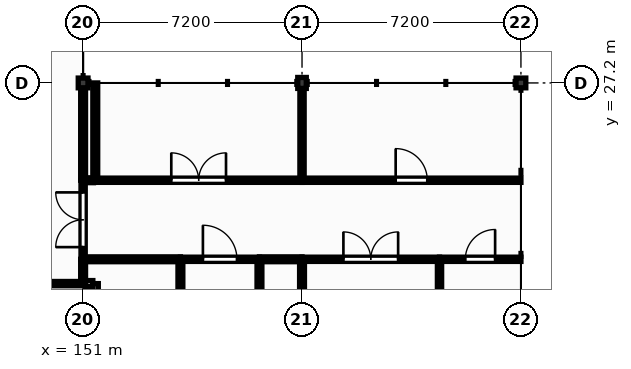
"""IFC4 building model, lengths in metres.
Left out: names, types, materials, properties, quantities, classifications, styles, units other than length and angle.
Written with IfcOpenShell. Run it as: python <this file> out.ifc"""

import sys

from ifc_helpers import new_model, si_unit, direction, frame, frame_2d, origin, origin_2d, place, context, subcontext, project, spatial, rectangle, extrude, element, fill, save


model = new_model("IFC4")
c1 = context("Model", 3, precision=1e-05, world=origin(), true_north=direction((0.0, 1.0)))
c2 = subcontext(c1, "Body", "Model", "MODEL_VIEW")
j1 = project(units=[si_unit("LENGTHUNIT", "METRE"), si_unit("PLANEANGLEUNIT", "RADIAN")], contexts=[c1])
p1 = place(None, origin())
s1 = spatial("IfcSite", under=j1, at=p1, CompositionType="ELEMENT")
p2 = place(p1, origin())
s2 = spatial("IfcBuilding", under=s1, at=p2, CompositionType="ELEMENT")
p3 = place(p2, frame((0.0, 0.0, 9.0)))
s3 = spatial("IfcBuildingStorey", under=s2, at=p3, CompositionType="ELEMENT", Elevation=9.0)
p4 = place(p3, frame((151.0, 27.2, 0.0), z_axis=(0.0, 0.0, 1.0), x_axis=(1.0, 0.0, 0.0)))
e1 = element("IfcColumn", 1, at=p4, inside=s3, PredefinedType="COLUMN", context=c2, shape_type="SweptSolid", body=[
    extrude(rectangle(XDim=0.32, YDim=0.32, at=origin_2d()), origin(), (0.0, 0.0, 1.0), 5.775),
])
p5 = place(p3, frame((158.2, 27.2, 0.0), z_axis=(0.0, 0.0, 1.0), x_axis=(1.0, 0.0, 0.0)))
e2 = element("IfcColumn", 2, at=p5, inside=s3, PredefinedType="COLUMN", context=c2, shape_type="SweptSolid", body=[
    extrude(rectangle(XDim=0.28, YDim=0.36, at=origin_2d()), origin(), (0.0, 0.0, 1.0), 7.57),
])
p6 = place(p3, frame((165.4, 27.2, 0.0), z_axis=(0.0, 0.0, 1.0), x_axis=(1.0, 0.0, 0.0)))
e3 = element("IfcColumn", 3, at=p6, inside=s3, PredefinedType="COLUMN", context=c2, shape_type="SweptSolid", body=[
    extrude(rectangle(XDim=0.32, YDim=0.32, at=origin_2d()), origin(), (0.0, 0.0, 1.0), 9.365),
])
p7 = place(p3, frame((147.6, 20.6, 0.0), z_axis=(0.0, 0.0, 1.0), x_axis=(1.0, 0.0, 0.0)))
e4 = element("IfcWall", 4, at=p7, inside=s3, PredefinedType="PARTITIONING", context=c2, shape_type="SweptSolid", body=[
    extrude(rectangle(XDim=3.4, YDim=0.14, at=frame_2d((1.7, 0.0))), origin(), (0.0, 0.0, 1.0), 3.78),
])
p8 = place(p7, frame((1.24, 0.0, 0.0)))
e5 = element("IfcOpeningElement", 5, at=p8, cuts=e4, PredefinedType="OPENING", context=c2, shape_type="SweptSolid", body=[
    extrude(rectangle(XDim=0.92, YDim=2.1, at=frame_2d((0.46, 1.05))), frame((0.0, 0.08, 0.0), z_axis=(0.0, -1.0, 0.0), x_axis=(1.0, 0.0, 0.0)), (0.0, 0.0, 1.0), 0.16),
])
p9 = place(p3, frame((151.0, 21.4, 0.0), z_axis=(0.0, 0.0, 1.0), x_axis=(0.0, 1.0, 0.0)))
e6 = element("IfcWall", 6, at=p9, inside=s3, PredefinedType="PARTITIONING", context=c2, shape_type="SweptSolid", body=[
    extrude(rectangle(XDim=2.6, YDim=0.14, at=frame_2d((1.3, 0.0))), origin(), (0.0, 0.0, 1.0), 3.78),
])
p10 = place(p9, frame((0.4, 0.0, 0.0)))
e7 = element("IfcOpeningElement", 7, at=p10, cuts=e6, PredefinedType="OPENING", context=c2, shape_type="SweptSolid", body=[
    extrude(rectangle(XDim=1.8, YDim=2.3, at=frame_2d((0.9, 1.15))), frame((0.0, 0.08, 0.0), z_axis=(0.0, -1.0, 0.0), x_axis=(1.0, 0.0, 0.0)), (0.0, 0.0, 1.0), 0.16),
])
p11 = place(p3, frame((151.4, 24.0, 0.0), z_axis=(0.0, 0.0, 1.0), x_axis=(1.0, 0.0, 0.0)))
e8 = element("IfcWall", 8, at=p11, inside=s3, PredefinedType="PARTITIONING", context=c2, shape_type="SweptSolid", body=[
    extrude(rectangle(XDim=6.8, YDim=0.14, at=frame_2d((3.4, 0.0))), origin(), (0.0, 0.0, 1.0), 3.78),
])
p12 = place(p11, frame((2.5, 0.0, 0.0)))
e9 = element("IfcOpeningElement", 9, at=p12, cuts=e8, PredefinedType="OPENING", context=c2, shape_type="SweptSolid", body=[
    extrude(rectangle(XDim=1.8, YDim=2.3, at=frame_2d((0.9, 1.15))), frame((0.0, 0.08, 0.0), z_axis=(0.0, -1.0, 0.0), x_axis=(1.0, 0.0, 0.0)), (0.0, 0.0, 1.0), 0.16),
])
p13 = place(p3, frame((154.2, 21.4, 0.0), z_axis=(0.0, 0.0, 1.0), x_axis=(1.0, 0.0, 0.0)))
e10 = element("IfcWall", 10, at=p13, inside=s3, PredefinedType="PARTITIONING", context=c2, shape_type="SweptSolid", body=[
    extrude(rectangle(XDim=2.6, YDim=0.14, at=frame_2d((1.3, 0.0))), origin(), (0.0, 0.0, 1.0), 3.78),
])
p14 = place(p13, frame((0.74, 0.0, 0.0)))
e11 = element("IfcOpeningElement", 11, at=p14, cuts=e10, PredefinedType="OPENING", context=c2, shape_type="SweptSolid", body=[
    extrude(rectangle(XDim=1.12, YDim=2.15, at=frame_2d((0.56, 1.075))), frame((0.0, 0.08, 0.0), z_axis=(0.0, -1.0, 0.0), x_axis=(1.0, 0.0, 0.0)), (0.0, 0.0, 1.0), 0.16),
])
p15 = place(p3, frame((158.2, 21.4, 0.0), z_axis=(0.0, 0.0, 1.0), x_axis=(1.0, 0.0, 0.0)))
e12 = element("IfcWall", 12, at=p15, inside=s3, PredefinedType="PARTITIONING", context=c2, shape_type="SweptSolid", body=[
    extrude(rectangle(XDim=4.522, YDim=0.14, at=frame_2d((2.261, 0.0))), origin(), (0.0, 0.0, 1.0), 3.78),
])
p16 = place(p15, frame((1.361, 0.0, 0.0)))
e13 = element("IfcOpeningElement", 13, at=p16, cuts=e12, PredefinedType="OPENING", context=c2, shape_type="SweptSolid", body=[
    extrude(rectangle(XDim=1.8, YDim=2.3, at=frame_2d((0.9, 1.15))), frame((0.0, 0.08, 0.0), z_axis=(0.0, -1.0, 0.0), x_axis=(1.0, 0.0, 0.0)), (0.0, 0.0, 1.0), 0.16),
])
p17 = place(p3, frame((158.2, 24.07, 0.0), z_axis=(0.0, 0.0, 1.0), x_axis=(0.0, 1.0, 0.0)))
e14 = element("IfcWall", 14, at=p17, inside=s3, PredefinedType="PARTITIONING", context=c2, shape_type="SweptSolid", body=[
    extrude(rectangle(XDim=2.95, YDim=0.14, at=frame_2d((1.475, 0.0))), origin(), (0.0, 0.0, 1.0), 3.78),
])
p18 = place(p3, frame((158.2, 24.0, 0.0), z_axis=(0.0, 0.0, 1.0), x_axis=(1.0, 0.0, 0.0)))
e15 = element("IfcWall", 15, at=p18, inside=s3, PredefinedType="PARTITIONING", context=c2, shape_type="SweptSolid", body=[
    extrude(rectangle(XDim=7.2, YDim=0.14, at=frame_2d((3.6, 0.0))), origin(), (0.0, 0.0, 1.0), 3.78),
])
p19 = place(p18, frame((3.08, 0.0, 0.0)))
e16 = element("IfcOpeningElement", 16, at=p19, cuts=e15, PredefinedType="OPENING", context=c2, shape_type="SweptSolid", body=[
    extrude(rectangle(XDim=1.04, YDim=2.1, at=frame_2d((0.52, 1.05))), frame((0.0, 0.08, 0.0), z_axis=(0.0, -1.0, 0.0), x_axis=(1.0, 0.0, 0.0)), (0.0, 0.0, 1.0), 0.16),
])
p20 = place(p3, frame((162.722, 18.6, 0.0), z_axis=(0.0, 0.0, 1.0), x_axis=(0.0, 1.0, 0.0)))
e17 = element("IfcWall", 17, at=p20, inside=s3, PredefinedType="PARTITIONING", context=c2, shape_type="SweptSolid", body=[
    extrude(rectangle(XDim=2.73, YDim=0.14, at=frame_2d((1.365, 0.0))), origin(), (0.0, 0.0, 1.0), 3.78),
])
p21 = place(p3, frame((162.722, 21.4, 0.0), z_axis=(0.0, 0.0, 1.0), x_axis=(1.0, 0.0, 0.0)))
e18 = element("IfcWall", 18, at=p21, inside=s3, PredefinedType="PARTITIONING", context=c2, shape_type="SweptSolid", body=[
    extrude(rectangle(XDim=2.678, YDim=0.14, at=frame_2d((1.339, 0.0))), origin(), (0.0, 0.0, 1.0), 3.78),
])
p22 = place(p21, frame((0.849, 0.0, 0.0)))
e19 = element("IfcOpeningElement", 19, at=p22, cuts=e18, PredefinedType="OPENING", context=c2, shape_type="SweptSolid", body=[
    extrude(rectangle(XDim=0.98, YDim=2.15, at=frame_2d((0.49, 1.075))), frame((0.0, 0.08, 0.0), z_axis=(0.0, -1.0, 0.0), x_axis=(1.0, 0.0, 0.0)), (0.0, 0.0, 1.0), 0.16),
])
p23 = place(p3, frame((151.4, 17.91, 0.0), z_axis=(0.0, 0.0, 1.0), x_axis=(0.0, 1.0, 0.0)))
e20 = element("IfcWall", 20, at=p23, inside=s3, PredefinedType="PARTITIONING", context=c2, shape_type="SweptSolid", body=[
    extrude(rectangle(XDim=2.69, YDim=0.2, at=frame_2d((1.345, 0.0))), origin(), (0.0, 0.0, 1.0), 3.78),
])
p24 = place(p3, frame((151.32, 20.6, 0.0), z_axis=(0.0, 0.0, 1.0), x_axis=(-1.0, 0.0, 0.0)))
e21 = element("IfcWall", 21, at=p24, inside=s3, PredefinedType="PARTITIONING", context=c2, shape_type="SweptSolid", body=[
    extrude(rectangle(XDim=0.26, YDim=0.2, at=frame_2d((0.13, 0.0))), origin(), (0.0, 0.0, 1.0), 3.78),
])
p25 = place(p3, frame((151.0, 20.67, 0.0), z_axis=(0.0, 0.0, 1.0), x_axis=(0.0, 1.0, 0.0)))
e22 = element("IfcWall", 22, at=p25, inside=s3, PredefinedType="PARTITIONING", context=c2, shape_type="SweptSolid", body=[
    extrude(rectangle(XDim=0.73, YDim=0.16, at=frame_2d((0.365, 0.0))), origin(), (0.0, 0.0, 1.0), 3.78),
])
p26 = place(p3, frame((151.0, 24.0, 0.0), z_axis=(0.0, 0.0, 1.0), x_axis=(0.0, 1.0, 0.0)))
e23 = element("IfcWall", 23, at=p26, inside=s3, PredefinedType="PARTITIONING", context=c2, shape_type="SweptSolid", body=[
    extrude(rectangle(XDim=3.04, YDim=0.16, at=frame_2d((1.52, 0.0))), origin(), (0.0, 0.0, 1.0), 3.78),
])
p27 = place(p3, frame((151.0, 21.4, 0.0), z_axis=(0.0, 0.0, 1.0), x_axis=(1.0, 0.0, 0.0)))
e24 = element("IfcWall", 24, at=p27, inside=s3, PredefinedType="PARTITIONING", context=c2, shape_type="SweptSolid", body=[
    extrude(rectangle(XDim=3.2, YDim=0.16, at=frame_2d((1.6, 0.0))), origin(), (0.0, 0.0, 1.0), 3.78),
])
p28 = place(p3, frame((156.8, 21.4, 0.0), z_axis=(0.0, 0.0, 1.0), x_axis=(1.0, 0.0, 0.0)))
e25 = element("IfcWall", 25, at=p28, inside=s3, PredefinedType="PARTITIONING", context=c2, shape_type="SweptSolid", body=[
    extrude(rectangle(XDim=1.4, YDim=0.16, at=frame_2d((0.7, 0.0))), origin(), (0.0, 0.0, 1.0), 3.78),
])
p29 = place(p3, frame((151.34, 24.0, 0.0), z_axis=(0.0, 0.0, 1.0), x_axis=(-1.0, 0.0, 0.0)))
e26 = element("IfcWall", 26, at=p29, inside=s3, PredefinedType="PARTITIONING", context=c2, shape_type="SweptSolid", body=[
    extrude(rectangle(XDim=0.28, YDim=0.16, at=frame_2d((0.14, 0.0))), origin(), (0.0, 0.0, 1.0), 3.78),
])
p30 = place(p3, frame((156.8, 17.8, 0.0), z_axis=(0.0, 0.0, 1.0), x_axis=(0.0, 1.0, 0.0)))
e27 = element("IfcWall", 27, at=p30, inside=s3, PredefinedType="PARTITIONING", context=c2, shape_type="SweptSolid", body=[
    extrude(rectangle(XDim=3.53, YDim=0.16, at=frame_2d((1.765, 0.0))), origin(), (0.0, 0.0, 1.0), 3.78),
])
p31 = place(p3, frame((154.2, 15.34, 0.0), z_axis=(0.0, 0.0, 1.0), x_axis=(0.0, 1.0, 0.0)))
e28 = element("IfcWall", 28, at=p31, inside=s3, PredefinedType="PARTITIONING", context=c2, shape_type="SweptSolid", body=[
    extrude(rectangle(XDim=5.99, YDim=0.16, at=frame_2d((2.995, 0.0))), origin(), (0.0, 0.0, 1.0), 3.78),
])
p32 = place(p3, frame((151.4, 24.07, 0.0), z_axis=(0.0, 0.0, 1.0), x_axis=(0.0, 1.0, 0.0)))
e29 = element("IfcWall", 29, at=p32, inside=s3, PredefinedType="PARTITIONING", context=c2, shape_type="SweptSolid", body=[
    extrude(rectangle(XDim=3.13, YDim=0.16, at=frame_2d((1.565, 0.0))), origin(), (0.0, 0.0, 1.0), 3.78),
])
p33 = place(p3, frame((158.2, 18.76, 0.0), z_axis=(0.0, 0.0, 1.0), x_axis=(0.0, 1.0, 0.0)))
e30 = element("IfcWall", 30, at=p33, inside=s3, PredefinedType="PARTITIONING", context=c2, shape_type="SweptSolid", body=[
    extrude(rectangle(XDim=2.57, YDim=0.16, at=frame_2d((1.285, 0.0))), origin(), (0.0, 0.0, 1.0), 3.78),
])
p34 = place(p10, origin())
e31 = element("IfcDoor", 31, at=p34, inside=s3, OperationType="DOUBLE_DOOR_SINGLE_SWING", PredefinedType="DOOR", context=c2, shape_type="SweptSolid", body=[
    extrude(rectangle(XDim=1.8, YDim=2.3, at=frame_2d((0.9, 1.15))), frame((0.0, 0.025, 0.0), z_axis=(0.0, -1.0, 0.0), x_axis=(1.0, 0.0, 0.0)), (0.0, 0.0, 1.0), 0.05),
])
fill(e7, e31)
p35 = place(p14, origin())
e32 = element("IfcDoor", 32, at=p35, inside=s3, OperationType="SINGLE_SWING_LEFT", PredefinedType="DOOR", context=c2, shape_type="SweptSolid", body=[
    extrude(rectangle(XDim=1.12, YDim=2.15, at=frame_2d((0.56, 1.075))), frame((0.0, 0.025, 0.0), z_axis=(0.0, -1.0, 0.0), x_axis=(1.0, 0.0, 0.0)), (0.0, 0.0, 1.0), 0.05),
])
fill(e11, e32)
p36 = place(p12, origin())
e33 = element("IfcDoor", 33, at=p36, inside=s3, OperationType="DOUBLE_DOOR_SINGLE_SWING", PredefinedType="DOOR", context=c2, shape_type="SweptSolid", body=[
    extrude(rectangle(XDim=1.8, YDim=2.3, at=frame_2d((0.9, 1.15))), frame((0.0, 0.025, 0.0), z_axis=(0.0, -1.0, 0.0), x_axis=(1.0, 0.0, 0.0)), (0.0, 0.0, 1.0), 0.05),
])
fill(e9, e33)
p37 = place(p16, origin())
e34 = element("IfcDoor", 34, at=p37, inside=s3, OperationType="DOUBLE_DOOR_SINGLE_SWING", PredefinedType="DOOR", context=c2, shape_type="SweptSolid", body=[
    extrude(rectangle(XDim=1.8, YDim=2.3, at=frame_2d((0.9, 1.15))), frame((0.0, 0.025, 0.0), z_axis=(0.0, -1.0, 0.0), x_axis=(1.0, 0.0, 0.0)), (0.0, 0.0, 1.0), 0.05),
])
fill(e13, e34)
p38 = place(p22, origin())
e35 = element("IfcDoor", 35, at=p38, inside=s3, OperationType="SINGLE_SWING_RIGHT", PredefinedType="DOOR", context=c2, shape_type="SweptSolid", body=[
    extrude(rectangle(XDim=0.98, YDim=2.15, at=frame_2d((0.49, 1.075))), frame((0.0, 0.025, 0.0), z_axis=(0.0, -1.0, 0.0), x_axis=(1.0, 0.0, 0.0)), (0.0, 0.0, 1.0), 0.05),
])
fill(e19, e35)
p39 = place(p19, origin())
e36 = element("IfcDoor", 36, at=p39, inside=s3, OperationType="SINGLE_SWING_LEFT", PredefinedType="DOOR", context=c2, shape_type="SweptSolid", body=[
    extrude(rectangle(XDim=1.04, YDim=2.1, at=frame_2d((0.52, 1.05))), frame((0.0, 0.025, 0.0), z_axis=(0.0, -1.0, 0.0), x_axis=(1.0, 0.0, 0.0)), (0.0, 0.0, 1.0), 0.05),
])
fill(e16, e36)
save(model, sys.argv[1])
